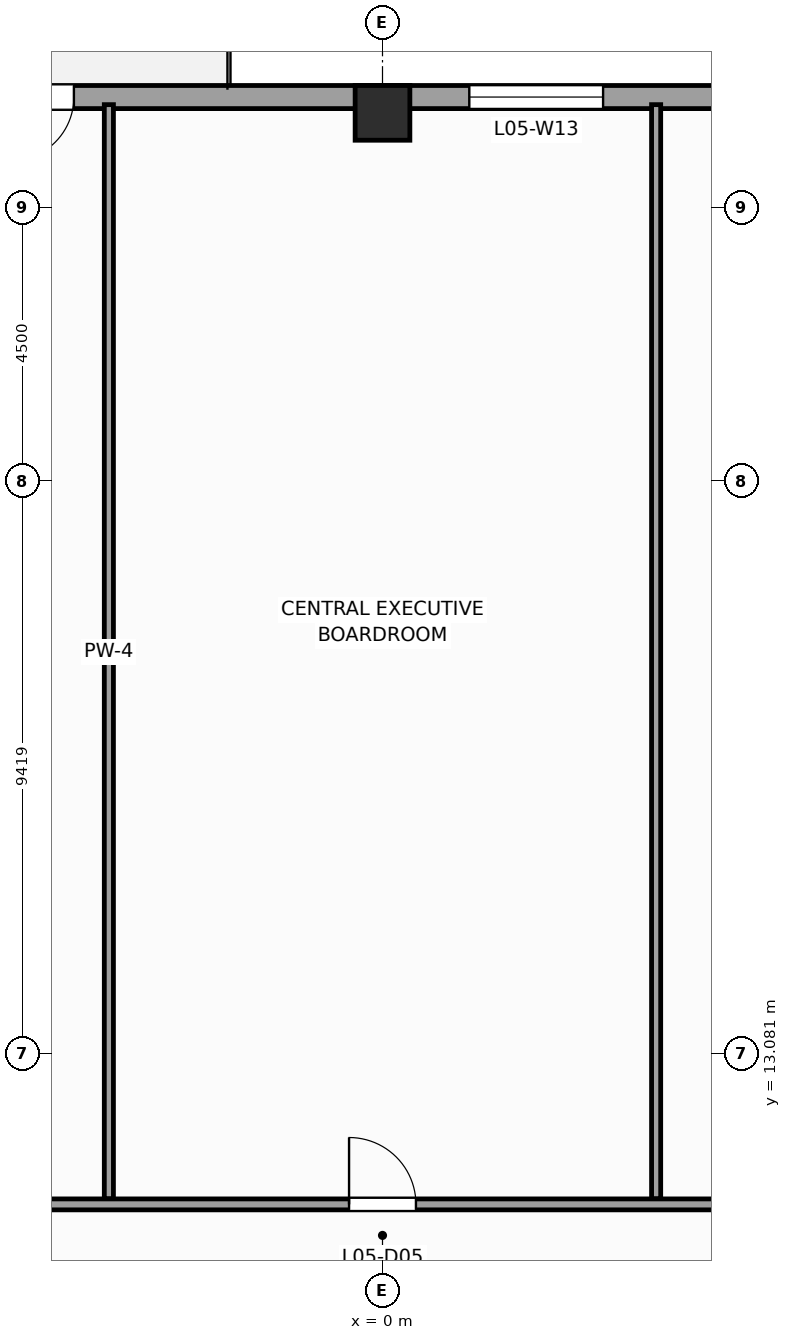
"""IFC4 building model, lengths in metres.
Left out: names, types, materials, properties, quantities, classifications, styles, units other than length and angle.
Written with IfcOpenShell. Run it as: python <this file> out.ifc"""

import sys

from ifc_helpers import new_model, si_unit, direction, frame, frame_2d, origin, origin_2d, place, context, subcontext, project, spatial, rectangle, extrude, source, transform, mapped, element, fill, save


model = new_model("IFC4")
c1 = context("Model", 3, precision=1e-05, world=origin(), true_north=direction((0.0, 1.0)))
c2 = subcontext(c1, "Body", "Model", "MODEL_VIEW")
j1 = project(units=[si_unit("LENGTHUNIT", "METRE"), si_unit("PLANEANGLEUNIT", "RADIAN")], contexts=[c1])
p1 = place(None, origin())
s1 = spatial("IfcSite", under=j1, at=p1, CompositionType="ELEMENT")
p2 = place(p1, origin())
s2 = spatial("IfcBuilding", under=s1, at=p2, CompositionType="ELEMENT")
p3 = place(p2, frame((0.0, 0.0, 26.0)))
s3 = spatial("IfcBuildingStorey", under=s2, at=p3, CompositionType="ELEMENT", Elevation=26.0)
m1 = source(origin(), c2, "Body", "SweptSolid", [
    extrude(rectangle(XDim=0.9, YDim=0.9, at=origin_2d()), origin(), (0.0, 0.0, 1.0), 4.0),
])
p4 = place(p3, frame((0.0, 28.55, 0.0), z_axis=(0.0, 0.0, 1.0), x_axis=(1.0, 0.0, 0.0)))
e1 = element("IfcColumn", 1, at=p4, inside=s3, PredefinedType="COLUMN", context=c2, shape_type="MappedRepresentation", body=[
    mapped(m1, transform((0.0, 0.0, 0.0), scale=1.0)),
])
p5 = place(p3, frame((25.69, 28.81, 0.0), z_axis=(0.0, 0.0, 1.0), x_axis=(-1.0, 0.0, 0.0)))
e2 = element("IfcWall", 2, at=p5, inside=s3, PredefinedType="STANDARD", context=c2, shape_type="SweptSolid", body=[
    extrude(rectangle(XDim=51.38, YDim=0.38, at=frame_2d((25.69, 0.0))), origin(), (0.0, 0.0, 1.0), 3.12),
])
p6 = place(p5, frame((30.765, 0.0, 0.0)))
e3 = element("IfcOpeningElement", 3, at=p6, cuts=e2, PredefinedType="OPENING", context=c2, shape_type="SweptSolid", body=[
    extrude(rectangle(XDim=1.05, YDim=2.25, at=frame_2d((0.525, 1.125))), frame((0.0, 0.2, 0.0), z_axis=(0.0, -1.0, 0.0), x_axis=(1.0, 0.0, 0.0)), (0.0, 0.0, 1.0), 0.4),
])
p7 = place(p5, frame((5.466, 0.0, 0.49)))
e4 = element("IfcOpeningElement", 4, at=p7, cuts=e2, PredefinedType="OPENING", context=c2, shape_type="SweptSolid", body=[
    extrude(rectangle(XDim=1.4, YDim=2.4, at=frame_2d((0.7, 1.2))), frame((0.0, 0.2, 0.0), z_axis=(0.0, -1.0, 0.0), x_axis=(1.0, 0.0, 0.0)), (0.0, 0.0, 1.0), 0.4),
])
p8 = place(p5, frame((13.8, 0.0, 0.49)))
e5 = element("IfcOpeningElement", 5, at=p8, cuts=e2, PredefinedType="OPENING", context=c2, shape_type="SweptSolid", body=[
    extrude(rectangle(XDim=2.2, YDim=2.4, at=frame_2d((1.1, 1.2))), frame((0.0, 0.2, 0.0), z_axis=(0.0, -1.0, 0.0), x_axis=(1.0, 0.0, 0.0)), (0.0, 0.0, 1.0), 0.4),
])
p9 = place(p5, frame((22.062, 0.0, 0.49)))
e6 = element("IfcOpeningElement", 6, at=p9, cuts=e2, PredefinedType="OPENING", context=c2, shape_type="SweptSolid", body=[
    extrude(rectangle(XDim=2.2, YDim=2.4, at=frame_2d((1.1, 1.2))), frame((0.0, 0.2, 0.0), z_axis=(0.0, -1.0, 0.0), x_axis=(1.0, 0.0, 0.0)), (0.0, 0.0, 1.0), 0.4),
])
p10 = place(p5, frame((33.838, 0.0, 0.49)))
e7 = element("IfcOpeningElement", 7, at=p10, cuts=e2, PredefinedType="OPENING", context=c2, shape_type="SweptSolid", body=[
    extrude(rectangle(XDim=2.2, YDim=2.4, at=frame_2d((1.1, 1.2))), frame((0.0, 0.2, 0.0), z_axis=(0.0, -1.0, 0.0), x_axis=(1.0, 0.0, 0.0)), (0.0, 0.0, 1.0), 0.4),
])
p11 = place(p5, frame((43.487, 0.0, 0.49)))
e8 = element("IfcOpeningElement", 8, at=p11, cuts=e2, PredefinedType="OPENING", context=c2, shape_type="SweptSolid", body=[
    extrude(rectangle(XDim=1.4, YDim=2.4, at=frame_2d((0.7, 1.2))), frame((0.0, 0.2, 0.0), z_axis=(0.0, -1.0, 0.0), x_axis=(1.0, 0.0, 0.0)), (0.0, 0.0, 1.0), 0.4),
])
p12 = place(p3, frame((-10.6, 10.6, 0.0), z_axis=(0.0, 0.0, 1.0), x_axis=(1.0, 0.0, 0.0)))
e9 = element("IfcWall", 9, at=p12, inside=s3, PredefinedType="PARTITIONING", context=c2, shape_type="SweptSolid", body=[
    extrude(rectangle(XDim=21.2, YDim=0.18, at=frame_2d((10.6, 0.0))), origin(), (0.0, 0.0, 1.0), 3.72),
])
p13 = place(p12, frame((10.05, 0.0, 0.0)))
e10 = element("IfcOpeningElement", 10, at=p13, cuts=e9, PredefinedType="OPENING", context=c2, shape_type="SweptSolid", body=[
    extrude(rectangle(XDim=1.1, YDim=2.2, at=frame_2d((0.55, 1.1))), frame((0.0, 0.1, 0.0), z_axis=(0.0, -1.0, 0.0), x_axis=(1.0, 0.0, 0.0)), (0.0, 0.0, 1.0), 0.2),
])
for number, where, z_axis, x_axis in (
    (11, (-4.5, 10.695, 0.0), (0.0, 0.0, 1.0), (0.0, 1.0, 0.0)),
    (12, (4.5, 10.695, 0.0), (0.0, 0.0, 1.0), (0.0, 1.0, 0.0)),
):
    element("IfcWall", number, at=place(p3, frame(where, z_axis=z_axis, x_axis=x_axis)), inside=s3, PredefinedType="PARTITIONING", context=c2, shape_type="SweptSolid", body=[
        extrude(rectangle(XDim=17.99, YDim=0.15, at=frame_2d((8.995, 0.0))), origin(), (0.0, 0.0, 1.0), 3.72),
    ])
m2 = source(origin(), c2, "Body", "SweptSolid", [
    extrude(rectangle(XDim=1.05, YDim=2.25, at=frame_2d((0.525, 1.125))), frame((0.0, 0.025, 0.0), z_axis=(0.0, -1.0, 0.0), x_axis=(1.0, 0.0, 0.0)), (0.0, 0.0, 1.0), 0.05),
])
p14 = place(p6, origin())
e13 = element("IfcDoor", 13, at=p14, inside=s3, OperationType="SINGLE_SWING_RIGHT", PredefinedType="DOOR", context=c2, shape_type="MappedRepresentation", body=[
    mapped(m2, transform((0.0, 0.0, 0.0), scale=1.0)),
])
fill(e3, e13)
m3 = source(origin(), c2, "Body", "SweptSolid", [
    extrude(rectangle(XDim=2.2, YDim=2.4, at=frame_2d((1.1, 1.2))), frame((0.0, 0.03, 0.0), z_axis=(0.0, -1.0, 0.0), x_axis=(1.0, 0.0, 0.0)), (0.0, 0.0, 1.0), 0.06),
])
p15 = place(p9, origin())
e14 = element("IfcWindow", 14, at=p15, inside=s3, PartitioningType="SINGLE_PANEL", PredefinedType="WINDOW", context=c2, shape_type="MappedRepresentation", body=[
    mapped(m3, transform((0.0, 0.0, 0.0), scale=1.0)),
])
fill(e6, e14)
m4 = source(origin(), c2, "Body", "SweptSolid", [
    extrude(rectangle(XDim=1.1, YDim=2.2, at=frame_2d((0.55, 1.1))), frame((0.0, 0.025, 0.0), z_axis=(0.0, -1.0, 0.0), x_axis=(1.0, 0.0, 0.0)), (0.0, 0.0, 1.0), 0.05),
])
p16 = place(p13, origin())
e15 = element("IfcDoor", 15, at=p16, inside=s3, OperationType="SINGLE_SWING_LEFT", PredefinedType="DOOR", context=c2, shape_type="MappedRepresentation", body=[
    mapped(m4, transform((0.0, 0.0, 0.0), scale=1.0)),
])
fill(e10, e15)
save(model, sys.argv[1])
